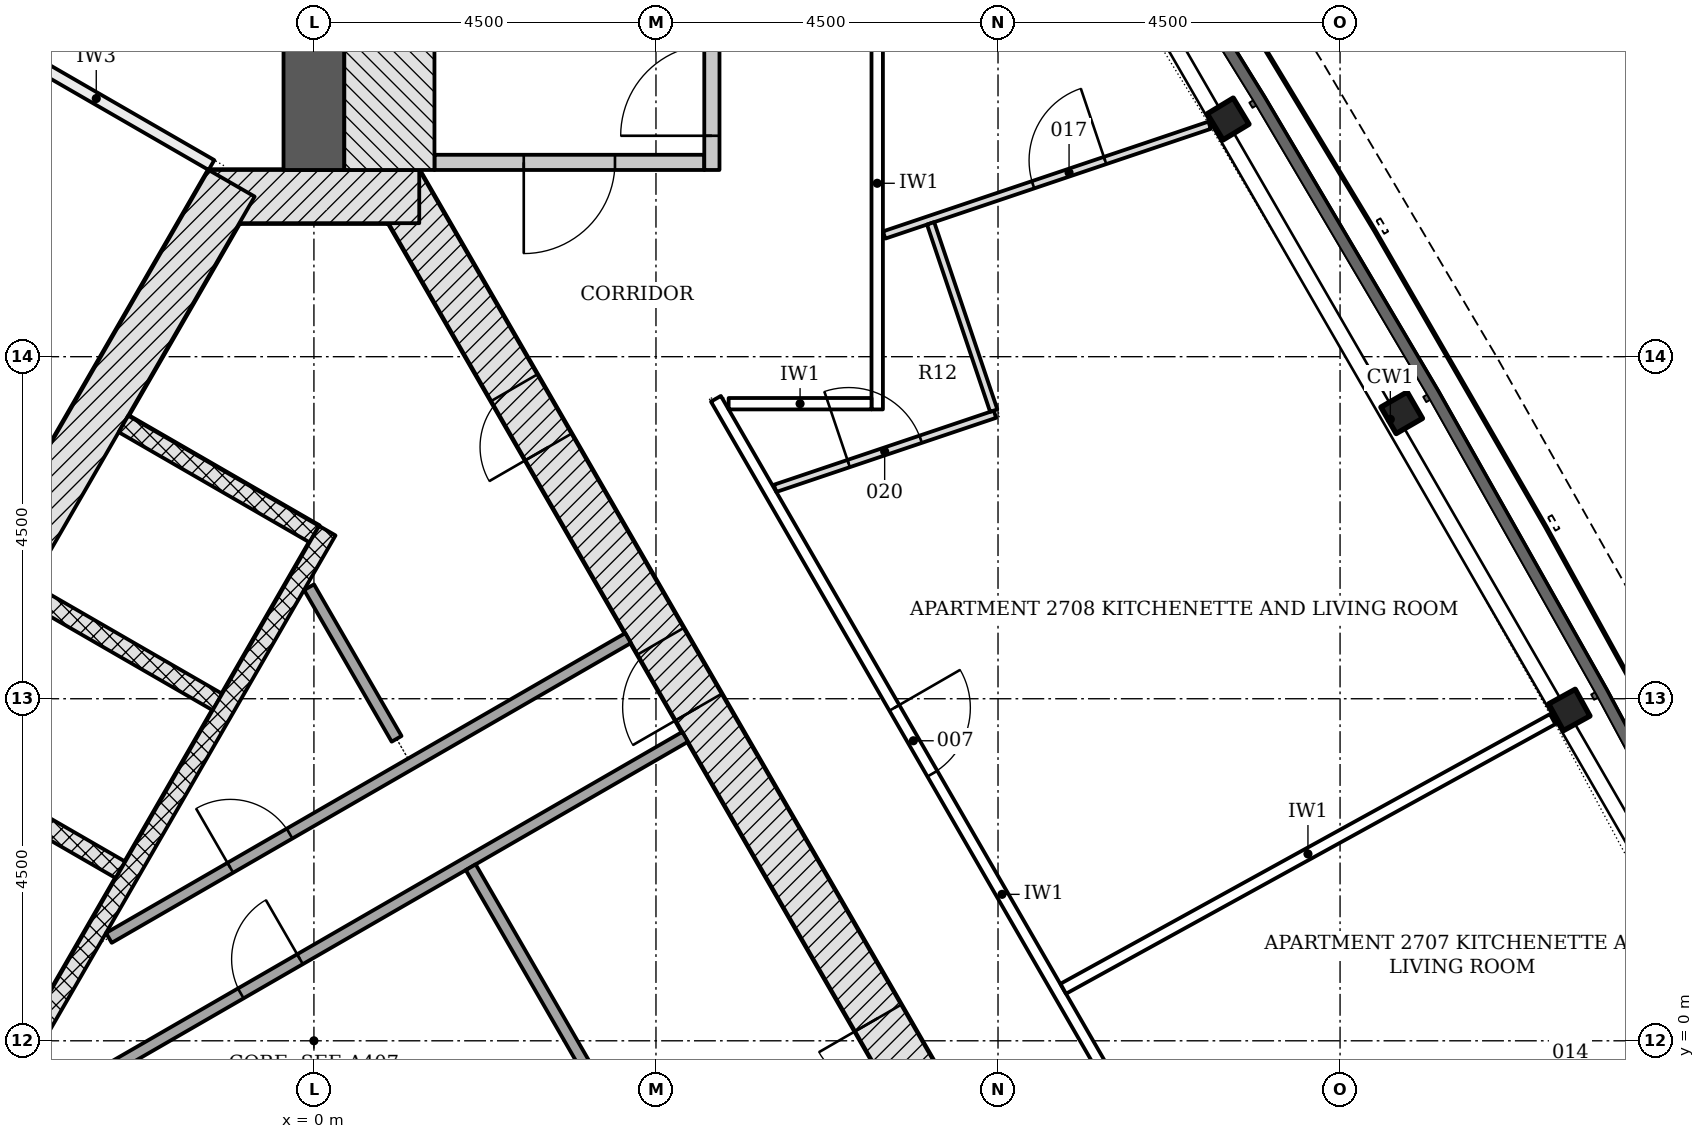
"""IFC4 building model, lengths in metres.
Left out: names, types, materials, properties, quantities, classifications, styles, units other than length and angle.
Written with IfcOpenShell. Run it as: python <this file> out.ifc"""

import sys

from ifc_helpers import new_model, si_unit, direction, frame, frame_2d, origin, origin_2d, place, context, subcontext, project, spatial, polyline, rectangle, i_section, outline, extrude, element, fill, save


model = new_model("IFC4")
c1 = context("Model", 3, precision=1e-05, world=origin(), true_north=direction((0.0, 1.0)))
c2 = subcontext(c1, "Body", "Model", "MODEL_VIEW")
j1 = project(units=[si_unit("LENGTHUNIT", "METRE"), si_unit("PLANEANGLEUNIT", "RADIAN")], contexts=[c1])
p1 = place(None, origin())
s1 = spatial("IfcSite", under=j1, at=p1, CompositionType="ELEMENT")
p2 = place(p1, origin())
s2 = spatial("IfcBuilding", under=s1, at=p2, CompositionType="ELEMENT")
p3 = place(p2, frame((0.0, 0.0, 105.9)))
s3 = spatial("IfcBuildingStorey", under=s2, at=p3, CompositionType="ELEMENT", Elevation=105.9)
p4 = place(p3, frame((10.311, -4.703, -0.2), z_axis=(0.0, 0.0, 1.0), x_axis=(-0.500001446645, 0.866024568562, 0.0)))
e1 = element("IfcWall", 1, at=p4, inside=s3, PredefinedType="SHEAR", context=c2, shape_type="SweptSolid", body=[
    extrude(rectangle(XDim=18.458, YDim=0.7, at=frame_2d((9.229, 0.0))), origin(), (0.0, 0.0, 1.0), 3.6),
])
p5 = place(p4, frame((10.5, 0.0, 0.2)))
e2 = element("IfcOpeningElement", 2, at=p5, cuts=e1, PredefinedType="OPENING", context=c2, shape_type="SweptSolid", body=[
    extrude(rectangle(XDim=1.0, YDim=2.1, at=frame_2d((0.5, 1.05))), frame((0.0, 0.36, 0.0), z_axis=(0.0, -1.0, 0.0), x_axis=(1.0, 0.0, 0.0)), (0.0, 0.0, 1.0), 0.72),
])
p6 = place(p4, frame((4.877, 0.0, 0.2)))
e3 = element("IfcOpeningElement", 3, at=p6, cuts=e1, PredefinedType="OPENING", context=c2, shape_type="SweptSolid", body=[
    extrude(rectangle(XDim=0.9, YDim=2.1, at=frame_2d((0.45, 1.05))), frame((0.0, 0.36, 0.0), z_axis=(0.0, -1.0, 0.0), x_axis=(1.0, 0.0, 0.0)), (0.0, 0.0, 1.0), 0.72),
])
p7 = place(p4, frame((14.452, 0.0, 0.2)))
e4 = element("IfcOpeningElement", 4, at=p7, cuts=e1, PredefinedType="OPENING", context=c2, shape_type="SweptSolid", body=[
    extrude(rectangle(XDim=0.9, YDim=2.1, at=frame_2d((0.45, 1.05))), frame((0.0, 0.36, 0.0), z_axis=(0.0, -1.0, 0.0), x_axis=(1.0, 0.0, 0.0)), (0.0, 0.0, 1.0), 0.72),
])
p8 = place(p3, frame((1.386, 11.106, -0.2), z_axis=(0.0, 0.0, 1.0), x_axis=(-1.0, 0.0, 0.0)))
e5 = element("IfcWall", 5, at=p8, inside=s3, PredefinedType="SHEAR", context=c2, shape_type="SweptSolid", body=[
    extrude(rectangle(XDim=2.771, YDim=0.7, at=frame_2d((1.386, 0.0))), origin(), (0.0, 0.0, 1.0), 3.6),
])
p9 = place(p3, frame((-1.083, 11.281, -0.2), z_axis=(0.0, 0.0, 1.0), x_axis=(-0.500001446645, -0.866024568562, 0.0)))
e6 = element("IfcWall", 6, at=p9, inside=s3, PredefinedType="SHEAR", context=c2, shape_type="SweptSolid", body=[
    extrude(rectangle(XDim=18.458, YDim=0.7, at=frame_2d((9.229, 0.0))), origin(), (0.0, 0.0, 1.0), 3.6),
])
p10 = place(p9, frame((8.979, 0.0, 0.2)))
e7 = element("IfcOpeningElement", 7, at=p10, cuts=e6, PredefinedType="OPENING", context=c2, shape_type="SweptSolid", body=[
    extrude(rectangle(XDim=1.2, YDim=2.1, at=frame_2d((0.6, 1.05))), frame((0.0, 0.36, 0.0), z_axis=(0.0, -1.0, 0.0), x_axis=(1.0, 0.0, 0.0)), (0.0, 0.0, 1.0), 0.72),
])
p11 = place(p9, frame((11.029, 0.0, 0.2)))
e8 = element("IfcOpeningElement", 8, at=p11, cuts=e6, PredefinedType="OPENING", context=c2, shape_type="SweptSolid", body=[
    extrude(rectangle(XDim=1.2, YDim=2.1, at=frame_2d((0.6, 1.05))), frame((0.0, 0.36, 0.0), z_axis=(0.0, -1.0, 0.0), x_axis=(1.0, 0.0, 0.0)), (0.0, 0.0, 1.0), 0.72),
])
p12 = place(p3, frame((0.0, 11.456, -0.2), z_axis=(0.0, 0.0, 1.0), x_axis=(0.0, 1.0, 0.0)))
e9 = element("IfcWall", 9, at=p12, inside=s3, PredefinedType="SHEAR", context=c2, shape_type="SweptSolid", body=[
    extrude(rectangle(XDim=11.919, YDim=0.8, at=frame_2d((5.959, 0.0))), origin(), (0.0, 0.0, 1.0), 3.6),
])
for number, where, z_axis, x_axis in (
    (10, (16.516, 4.353, -0.2), (0.0, 0.0, 1.0), (-0.483, 0.876, 0.0)),
    (11, (14.311, 8.262, -0.2), (0.0, 0.0, 1.0), (-0.5, 0.866, 0.0)),
    (12, (12.027, 12.127, -0.2), (0.0, 0.0, 1.0), (-0.517, 0.856, 0.0)),
):
    element("IfcColumn", number, at=place(p3, frame(where, z_axis=z_axis, x_axis=x_axis)), inside=s3, PredefinedType="COLUMN", context=c2, shape_type="SweptSolid", body=[
        extrude(i_section(OverallWidth=0.401, OverallDepth=0.399, WebThickness=0.025, FlangeThickness=0.04, FilletRadius=0.015, at=origin_2d()), origin(), (0.0, 0.0, 1.0), 3.6),
    ])
p13 = place(p3, origin())
e13 = element("IfcWall", 13, at=p13, inside=s3, PredefinedType="PARAPET", context=c2, shape_type="SweptSolid", body=[
    extrude(outline(polyline([(-3.375, 26.953), (-5.966, 28.358), (-8.687, 29.371), (-11.446, 29.958), (-14.148, 30.099), (-16.702, 29.789), (-19.02, 29.039), (-21.024, 27.873), (-22.646, 26.333), (-23.83, 24.469), (-24.536, 22.347), (-24.74, 20.038), (-24.435, 17.62), (-23.631, 15.176), (-22.356, 12.79), (-20.653, 10.542), (-18.58, 8.509), (-16.208, 6.76), (-16.06, 6.961), (-18.418, 8.699), (-20.465, 10.707), (-22.145, 12.925), (-23.4, 15.275), (-24.19, 17.675), (-24.489, 20.042), (-24.29, 22.296), (-23.603, 24.362), (-22.452, 26.173), (-20.873, 27.672), (-18.918, 28.809), (-16.647, 29.544), (-14.139, 29.848), (-11.478, 29.709), (-8.757, 29.13), (-6.07, 28.129), (-3.495, 26.733), (-3.375, 26.953)])), origin(), (0.0, 0.0, 1.0), 1.1),
])
p14 = place(p3, frame((-2.506, 8.115, -0.2), z_axis=(0.0, 0.0, 1.0), x_axis=(0.865996321171, -0.50005036918, 0.0)))
e14 = element("IfcWall", 14, at=p14, inside=s3, PredefinedType="PARTITIONING", context=c2, shape_type="SweptSolid", body=[
    extrude(rectangle(XDim=2.9, YDim=0.25, at=frame_2d((1.45, 0.0))), origin(), (0.0, 0.0, 1.0), 3.6),
])
for number, where, z_axis, x_axis in (
    (15, (-3.781, 5.907, -0.2), (0.0, 0.0, 1.0), (0.866, -0.5, 0.0)),
    (16, (-5.056, 3.699, -0.2), (0.0, 0.0, 1.0), (0.866, -0.5, 0.0)),
):
    element("IfcWall", number, at=place(p3, frame(where, z_axis=z_axis, x_axis=x_axis)), inside=s3, PredefinedType="PARTITIONING", context=c2, shape_type="SweptSolid", body=[
        extrude(rectangle(XDim=2.9, YDim=0.25, at=frame_2d((1.45, 0.0))), origin(), (0.0, 0.0, 1.0), 3.6),
    ])
p15 = place(p3, frame((0.176, 6.711, 0.0), z_axis=(0.0, 0.0, 1.0), x_axis=(-0.500004227369, -0.866022963098, 0.0)))
e17 = element("IfcWall", 17, at=p15, inside=s3, PredefinedType="PARTITIONING", context=c2, shape_type="SweptSolid", body=[
    extrude(rectangle(XDim=11.8, YDim=0.25, at=frame_2d((5.9, 0.0))), origin(), (0.0, 0.0, 1.0), 3.4),
])
p16 = place(p3, frame((-4.198, -1.244, 0.0), z_axis=(0.0, 0.0, 1.0), x_axis=(0.866020798945, 0.500007975732, 0.0)))
e18 = element("IfcWall", 18, at=p16, inside=s3, PredefinedType="PARTITIONING", context=c2, shape_type="SweptSolid", body=[
    extrude(rectangle(XDim=10.486, YDim=0.15, at=frame_2d((5.243, 0.0))), origin(), (0.0, 0.0, 1.0), 3.4),
])
p17 = place(p16, frame((3.736, 0.0, 0.0)))
e19 = element("IfcOpeningElement", 19, at=p17, cuts=e18, PredefinedType="OPENING", context=c2, shape_type="SweptSolid", body=[
    extrude(rectangle(XDim=0.9, YDim=2.1, at=frame_2d((0.45, 1.05))), frame((0.0, 0.085, 0.0), z_axis=(0.0, -1.0, 0.0), x_axis=(1.0, 0.0, 0.0)), (0.0, 0.0, 1.0), 0.17),
])
p18 = place(p16, frame((0.144, 0.0, 0.0)))
e20 = element("IfcOpeningElement", 20, at=p18, cuts=e18, PredefinedType="OPENING", context=c2, shape_type="SweptSolid", body=[
    extrude(rectangle(XDim=0.9, YDim=2.1, at=frame_2d((0.45, 1.05))), frame((0.0, 0.085, 0.0), z_axis=(0.0, -1.0, 0.0), x_axis=(1.0, 0.0, 0.0)), (0.0, 0.0, 1.0), 0.17),
])
p19 = place(p3, frame((5.367, -3.439, 0.0), z_axis=(0.0, 0.0, 1.0), x_axis=(-0.499981499682, 0.866036084685, 0.0)))
e21 = element("IfcWall", 21, at=p19, inside=s3, PredefinedType="PARTITIONING", context=c2, shape_type="SweptSolid", body=[
    extrude(rectangle(XDim=6.608, YDim=0.15, at=frame_2d((3.304, 0.0))), origin(), (0.0, 0.0, 1.0), 3.4),
])
p20 = place(p3, frame((-2.698, 1.354, 0.0), z_axis=(0.0, 0.0, 1.0), x_axis=(0.866021157486, 0.500007354732, 0.0)))
e22 = element("IfcWall", 22, at=p20, inside=s3, PredefinedType="PARTITIONING", context=c2, shape_type="SweptSolid", body=[
    extrude(rectangle(XDim=7.888, YDim=0.15, at=frame_2d((3.944, 0.0))), origin(), (0.0, 0.0, 1.0), 3.4),
])
p21 = place(p20, frame((1.845, 0.0, 0.0)))
e23 = element("IfcOpeningElement", 23, at=p21, cuts=e22, PredefinedType="OPENING", context=c2, shape_type="SweptSolid", body=[
    extrude(rectangle(XDim=0.9, YDim=2.1, at=frame_2d((0.45, 1.05))), frame((0.0, 0.085, 0.0), z_axis=(0.0, -1.0, 0.0), x_axis=(1.0, 0.0, 0.0)), (0.0, 0.0, 1.0), 0.17),
])
p22 = place(p3, frame((1.088, 3.972, 0.0), z_axis=(0.0, 0.0, 1.0), x_axis=(-0.500116913307, 0.865957893332, 0.0)))
e24 = element("IfcWall", 24, at=p22, inside=s3, PredefinedType="PARTITIONING", context=c2, shape_type="SweptSolid", body=[
    extrude(rectangle(XDim=2.304, YDim=0.15, at=frame_2d((1.152, 0.0))), origin(), (0.0, 0.0, 1.0), 3.4),
])
p23 = place(p3, frame((5.135, 11.556, -0.2), z_axis=(0.0, 0.0, 1.0), x_axis=(-1.0, 0.0, 0.0)))
e25 = element("IfcWall", 25, at=p23, inside=s3, PredefinedType="SHEAR", context=c2, shape_type="SweptSolid", body=[
    extrude(rectangle(XDim=3.55, YDim=0.2, at=frame_2d((1.775, 0.0))), origin(), (0.0, 0.0, 1.0), 3.6),
])
p24 = place(p23, frame((1.175, 0.0, 0.2)))
e26 = element("IfcOpeningElement", 26, at=p24, cuts=e25, PredefinedType="OPENING", context=c2, shape_type="SweptSolid", body=[
    extrude(rectangle(XDim=1.2, YDim=2.1, at=frame_2d((0.6, 1.05))), frame((0.0, 0.11, 0.0), z_axis=(0.0, -1.0, 0.0), x_axis=(1.0, 0.0, 0.0)), (0.0, 0.0, 1.0), 0.22),
])
p25 = place(p3, frame((5.236, 11.456, -0.2), z_axis=(0.0, 0.0, 1.0), x_axis=(0.0, 1.0, 0.0)))
e27 = element("IfcWall", 27, at=p25, inside=s3, PredefinedType="SHEAR", context=c2, shape_type="SweptSolid", body=[
    extrude(rectangle(XDim=5.6, YDim=0.2, at=frame_2d((2.8, 0.0))), origin(), (0.0, 0.0, 1.0), 3.6),
])
p26 = place(p25, frame((0.45, 0.0, 0.2)))
e28 = element("IfcOpeningElement", 28, at=p26, cuts=e27, PredefinedType="OPENING", context=c2, shape_type="SweptSolid", body=[
    extrude(rectangle(XDim=1.2, YDim=2.1, at=frame_2d((0.6, 1.05))), frame((0.0, 0.11, 0.0), z_axis=(0.0, -1.0, 0.0), x_axis=(1.0, 0.0, 0.0)), (0.0, 0.0, 1.0), 0.22),
])
p27 = place(p3, frame((0.993, 11.456, -0.2), z_axis=(0.0, 0.0, 1.0), x_axis=(0.0, 1.0, 0.0)))
e29 = element("IfcWall", 29, at=p27, inside=s3, PredefinedType="SHEAR", context=c2, shape_type="SweptSolid", body=[
    extrude(rectangle(XDim=7.2, YDim=1.186, at=frame_2d((3.6, 0.0))), origin(), (0.0, 0.0, 1.0), 3.6),
])
p28 = place(p3, frame((5.289, 8.446, 0.0), z_axis=(0.0, 0.0, 1.0), x_axis=(0.499996620721, -0.866027354803, 0.0)))
e30 = element("IfcWall", 30, at=p28, inside=s3, PredefinedType="PARTITIONING", context=c2, shape_type="SweptSolid", body=[
    extrude(rectangle(XDim=15.057, YDim=0.15, at=frame_2d((7.528, 0.0))), origin(), (0.0, 0.0, 1.0), 2.847),
])
p29 = place(p28, frame((10.689, 0.0, 0.0)))
e31 = element("IfcOpeningElement", 31, at=p29, cuts=e30, PredefinedType="OPENING", context=c2, shape_type="SweptSolid", body=[
    extrude(rectangle(XDim=1.0, YDim=2.1, at=frame_2d((0.5, 1.05))), frame((0.0, 0.085, 0.0), z_axis=(0.0, -1.0, 0.0), x_axis=(1.0, 0.0, 0.0)), (0.0, 0.0, 1.0), 0.17),
])
p30 = place(p28, frame((4.695, 0.0, 0.0)))
e32 = element("IfcOpeningElement", 32, at=p30, cuts=e30, PredefinedType="OPENING", context=c2, shape_type="SweptSolid", body=[
    extrude(rectangle(XDim=1.0, YDim=2.1, at=frame_2d((0.5, 1.05))), frame((0.0, 0.085, 0.0), z_axis=(0.0, -1.0, 0.0), x_axis=(1.0, 0.0, 0.0)), (0.0, 0.0, 1.0), 0.17),
])
p31 = place(p3, frame((7.411, 8.306, 0.0), z_axis=(0.0, 0.0, 1.0), x_axis=(0.0, 1.0, 0.0)))
e33 = element("IfcWall", 33, at=p31, inside=s3, PredefinedType="PARTITIONING", context=c2, shape_type="SweptSolid", body=[
    extrude(rectangle(XDim=5.95, YDim=0.15, at=frame_2d((2.975, 0.0))), origin(), (0.0, 0.0, 1.0), 2.847),
])
p32 = place(p3, frame((-4.379, 13.271, 0.0), z_axis=(0.0, 0.0, 1.0), x_axis=(0.866019471182, -0.500010275428, 0.0)))
e34 = element("IfcWall", 34, at=p32, inside=s3, PredefinedType="PARTITIONING", context=c2, shape_type="SweptSolid", body=[
    extrude(rectangle(XDim=3.5, YDim=0.15, at=frame_2d((1.75, 0.0))), origin(), (0.0, 0.0, 1.0), 3.4),
])
p33 = place(p3, frame((5.456, 8.381, 0.0), z_axis=(0.0, 0.0, 1.0), x_axis=(1.0, 0.0, 0.0)))
e35 = element("IfcWall", 35, at=p33, inside=s3, PredefinedType="PARTITIONING", context=c2, shape_type="SweptSolid", body=[
    extrude(rectangle(XDim=1.88, YDim=0.15, at=frame_2d((0.94, 0.0))), origin(), (0.0, 0.0, 1.0), 2.847),
])
p34 = place(p3, frame((16.297, 4.232, 0.0), z_axis=(0.0, 0.0, 1.0), x_axis=(-0.875895262359, -0.482501284327, 0.0)))
e36 = element("IfcWall", 36, at=p34, inside=s3, PredefinedType="PARTITIONING", context=c2, shape_type="SweptSolid", body=[
    extrude(rectangle(XDim=7.351, YDim=0.15, at=frame_2d((3.676, 0.0))), origin(), (0.0, 0.0, 1.0), 2.847),
])
p35 = place(p3, frame((18.421, 0.283, 0.0), z_axis=(0.0, 0.0, 1.0), x_axis=(-0.885392336097, -0.464844502151, 0.0)))
e37 = element("IfcWall", 37, at=p35, inside=s3, PredefinedType="PARTITIONING", context=c2, shape_type="SweptSolid", body=[
    extrude(rectangle(XDim=7.22, YDim=0.1, at=frame_2d((3.61, 0.0))), origin(), (0.0, 0.0, 1.0), 2.847),
])
p36 = place(p35, frame((5.196, 0.0, 0.0)))
e38 = element("IfcOpeningElement", 38, at=p36, cuts=e37, PredefinedType="OPENING", context=c2, shape_type="SweptSolid", body=[
    extrude(rectangle(XDim=1.0, YDim=2.1, at=frame_2d((0.5, 1.05))), frame((0.0, 0.06, 0.0), z_axis=(0.0, -1.0, 0.0), x_axis=(1.0, 0.0, 0.0)), (0.0, 0.0, 1.0), 0.12),
])
p37 = place(p35, frame((1.634, 0.0, 0.0)))
e39 = element("IfcOpeningElement", 39, at=p37, cuts=e37, PredefinedType="OPENING", context=c2, shape_type="SweptSolid", body=[
    extrude(rectangle(XDim=1.0, YDim=2.1, at=frame_2d((0.5, 1.05))), frame((0.0, 0.06, 0.0), z_axis=(0.0, -1.0, 0.0), x_axis=(1.0, 0.0, 0.0)), (0.0, 0.0, 1.0), 0.12),
])
p38 = place(p3, frame((7.502, 10.601, 0.0), z_axis=(0.0, 0.0, 1.0), x_axis=(0.947570000993, 0.319548264303, 0.0)))
e40 = element("IfcWall", 40, at=p38, inside=s3, PredefinedType="PARTITIONING", context=c2, shape_type="SweptSolid", body=[
    extrude(rectangle(XDim=4.519, YDim=0.1, at=frame_2d((2.26, 0.0))), origin(), (0.0, 0.0, 1.0), 2.847),
])
p39 = place(p38, frame((2.068, 0.0, 0.0)))
e41 = element("IfcOpeningElement", 41, at=p39, cuts=e40, PredefinedType="OPENING", context=c2, shape_type="SweptSolid", body=[
    extrude(rectangle(XDim=1.0, YDim=2.1, at=frame_2d((0.5, 1.05))), frame((0.0, 0.06, 0.0), z_axis=(0.0, -1.0, 0.0), x_axis=(1.0, 0.0, 0.0)), (0.0, 0.0, 1.0), 0.12),
])
p40 = place(p3, frame((6.067, 7.268, 0.0), z_axis=(0.0, 0.0, 1.0), x_axis=(0.94756585242, 0.319560565978, 0.0)))
e42 = element("IfcWall", 42, at=p40, inside=s3, PredefinedType="PARTITIONING", context=c2, shape_type="SweptSolid", body=[
    extrude(rectangle(XDim=3.053, YDim=0.1, at=frame_2d((1.526, 0.0))), origin(), (0.0, 0.0, 1.0), 3.4),
])
p41 = place(p40, frame((1.021, 0.0, 0.0)))
e43 = element("IfcOpeningElement", 43, at=p41, cuts=e42, PredefinedType="OPENING", context=c2, shape_type="SweptSolid", body=[
    extrude(rectangle(XDim=1.0, YDim=2.1, at=frame_2d((0.5, 1.05))), frame((0.0, 0.06, 0.0), z_axis=(0.0, -1.0, 0.0), x_axis=(1.0, 0.0, 0.0)), (0.0, 0.0, 1.0), 0.12),
])
p42 = place(p3, frame((8.113, 10.754, 0.0), z_axis=(0.0, 0.0, 1.0), x_axis=(0.31954997077, -0.94756942552, 0.0)))
e44 = element("IfcWall", 44, at=p42, inside=s3, PredefinedType="PARTITIONING", context=c2, shape_type="SweptSolid", body=[
    extrude(rectangle(XDim=2.6, YDim=0.1, at=frame_2d((1.3, 0.0))), origin(), (0.0, 0.0, 1.0), 2.847),
])
p43 = place(p5, origin())
e45 = element("IfcDoor", 45, at=p43, inside=s3, OperationType="SINGLE_SWING_LEFT", PredefinedType="DOOR", context=c2, shape_type="SweptSolid", body=[
    extrude(rectangle(XDim=1.0, YDim=2.1, at=frame_2d((0.5, 1.05))), frame((0.0, 0.075, 0.0), z_axis=(0.0, -1.0, 0.0), x_axis=(1.0, 0.0, 0.0)), (0.0, 0.0, 1.0), 0.15),
])
fill(e2, e45)
p44 = place(p6, origin())
e46 = element("IfcDoor", 46, at=p44, inside=s3, OperationType="SINGLE_SWING_RIGHT", PredefinedType="DOOR", context=c2, shape_type="SweptSolid", body=[
    extrude(rectangle(XDim=0.9, YDim=2.1, at=frame_2d((0.45, 1.05))), frame((0.0, 0.075, 0.0), z_axis=(0.0, -1.0, 0.0), x_axis=(1.0, 0.0, 0.0)), (0.0, 0.0, 1.0), 0.15),
])
fill(e3, e46)
p45 = place(p7, origin())
e47 = element("IfcDoor", 47, at=p45, inside=s3, OperationType="SINGLE_SWING_LEFT", PredefinedType="DOOR", context=c2, shape_type="SweptSolid", body=[
    extrude(rectangle(XDim=0.9, YDim=2.1, at=frame_2d((0.45, 1.05))), frame((0.0, 0.075, 0.0), z_axis=(0.0, -1.0, 0.0), x_axis=(1.0, 0.0, 0.0)), (0.0, 0.0, 1.0), 0.15),
])
fill(e4, e47)
p46 = place(p17, origin())
e48 = element("IfcDoor", 48, at=p46, inside=s3, OperationType="SINGLE_SWING_RIGHT", PredefinedType="DOOR", context=c2, shape_type="SweptSolid", body=[
    extrude(rectangle(XDim=0.9, YDim=2.1, at=frame_2d((0.45, 1.05))), frame((0.0, 0.025, 0.0), z_axis=(0.0, -1.0, 0.0), x_axis=(1.0, 0.0, 0.0)), (0.0, 0.0, 1.0), 0.05),
])
fill(e19, e48)
p47 = place(p21, origin())
e49 = element("IfcDoor", 49, at=p47, inside=s3, OperationType="SINGLE_SWING_LEFT", PredefinedType="DOOR", context=c2, shape_type="SweptSolid", body=[
    extrude(rectangle(XDim=0.9, YDim=2.1, at=frame_2d((0.45, 1.05))), frame((0.0, 0.025, 0.0), z_axis=(0.0, -1.0, 0.0), x_axis=(1.0, 0.0, 0.0)), (0.0, 0.0, 1.0), 0.05),
])
fill(e23, e49)
p48 = place(p24, origin())
e50 = element("IfcDoor", 50, at=p48, inside=s3, OperationType="SINGLE_SWING_RIGHT", PredefinedType="DOOR", context=c2, shape_type="SweptSolid", body=[
    extrude(rectangle(XDim=1.2, YDim=2.1, at=frame_2d((0.6, 1.05))), frame((0.0, 0.025, 0.0), z_axis=(0.0, -1.0, 0.0), x_axis=(1.0, 0.0, 0.0)), (0.0, 0.0, 1.0), 0.05),
])
fill(e26, e50)
p49 = place(p26, origin())
e51 = element("IfcDoor", 51, at=p49, inside=s3, OperationType="SINGLE_SWING_LEFT", PredefinedType="DOOR", context=c2, shape_type="SweptSolid", body=[
    extrude(rectangle(XDim=1.2, YDim=2.1, at=frame_2d((0.6, 1.05))), frame((0.0, 0.025, 0.0), z_axis=(0.0, -1.0, 0.0), x_axis=(1.0, 0.0, 0.0)), (0.0, 0.0, 1.0), 0.05),
])
fill(e28, e51)
p50 = place(p30, origin())
e52 = element("IfcDoor", 52, at=p50, inside=s3, OperationType="SINGLE_SWING_LEFT", PredefinedType="DOOR", context=c2, shape_type="SweptSolid", body=[
    extrude(rectangle(XDim=1.0, YDim=2.1, at=frame_2d((0.5, 1.05))), frame((0.0, 0.025, 0.0), z_axis=(0.0, -1.0, 0.0), x_axis=(1.0, 0.0, 0.0)), (0.0, 0.0, 1.0), 0.05),
])
fill(e32, e52)
p51 = place(p39, origin())
e53 = element("IfcDoor", 53, at=p51, inside=s3, OperationType="SINGLE_SWING_RIGHT", PredefinedType="DOOR", context=c2, shape_type="SweptSolid", body=[
    extrude(rectangle(XDim=1.0, YDim=2.1, at=frame_2d((0.5, 1.05))), frame((0.0, 0.025, 0.0), z_axis=(0.0, -1.0, 0.0), x_axis=(1.0, 0.0, 0.0)), (0.0, 0.0, 1.0), 0.05),
])
fill(e41, e53)
p52 = place(p41, origin())
e54 = element("IfcDoor", 54, at=p52, inside=s3, OperationType="SINGLE_SWING_LEFT", PredefinedType="DOOR", context=c2, shape_type="SweptSolid", body=[
    extrude(rectangle(XDim=1.0, YDim=2.1, at=frame_2d((0.5, 1.05))), frame((0.0, 0.025, 0.0), z_axis=(0.0, -1.0, 0.0), x_axis=(1.0, 0.0, 0.0)), (0.0, 0.0, 1.0), 0.05),
])
fill(e43, e54)
save(model, sys.argv[1])
